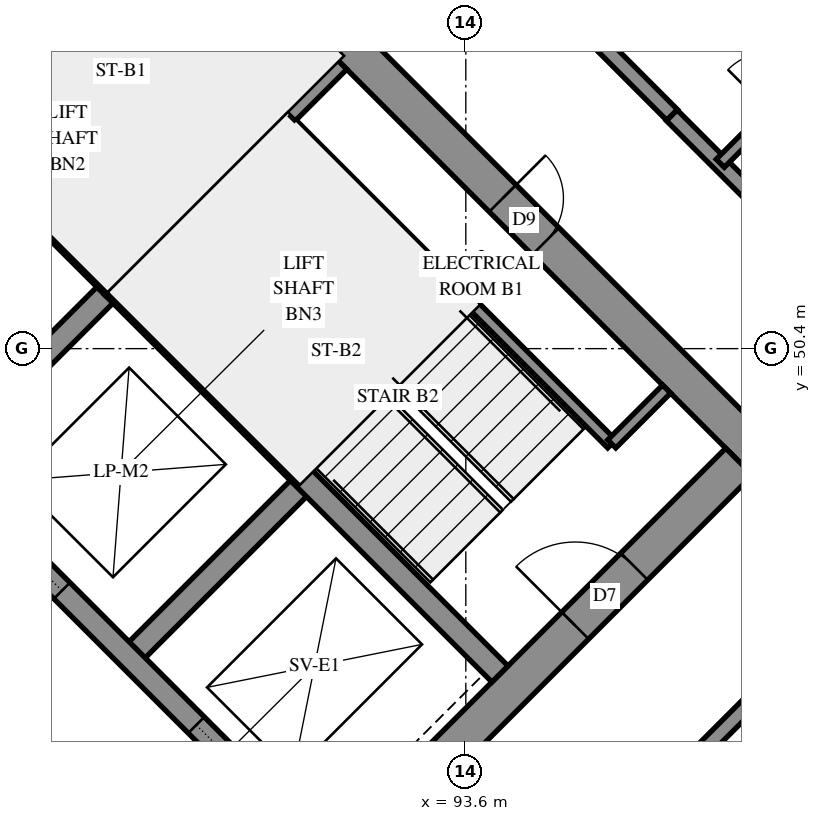
"""IFC4 building model, lengths in metres.
Left out: names, types, materials, properties, quantities, classifications, styles, units other than length and angle.
Written with IfcOpenShell. Run it as: python <this file> out.ifc"""

import sys

from ifc_helpers import new_model, si_unit, direction, frame, frame_2d, origin, place, context, subcontext, project, spatial, rectangle, extrude, element, fill, save


model = new_model("IFC4")
c1 = context("Model", 3, precision=1e-05, world=origin(), true_north=direction((0.0, 1.0)))
c2 = subcontext(c1, "Body", "Model", "MODEL_VIEW")
j1 = project(units=[si_unit("LENGTHUNIT", "METRE"), si_unit("PLANEANGLEUNIT", "RADIAN")], contexts=[c1])
p1 = place(None, origin())
s1 = spatial("IfcSite", under=j1, at=p1, CompositionType="ELEMENT")
p2 = place(p1, origin())
s2 = spatial("IfcBuilding", under=s1, at=p2, CompositionType="ELEMENT")
p3 = place(p2, frame((0.0, 0.0, 199.8)))
s3 = spatial("IfcBuildingStorey", under=s2, at=p3, CompositionType="ELEMENT", Elevation=199.8)
p4 = place(p3, frame((86.66, 59.802, -0.3), z_axis=(0.0, 0.0, 1.0), x_axis=(0.7071067812, -0.7071067812, 0.0)))
e1 = element("IfcWall", 1, at=p4, inside=s3, PredefinedType="SHEAR", context=c2, shape_type="SweptSolid", body=[
    extrude(rectangle(XDim=15.4, YDim=0.5, at=frame_2d((7.7, 0.0))), origin(), (0.0, 0.0, 1.0), 2.7),
])
p5 = place(p4, frame((10.5, 0.0, 0.3)))
e2 = element("IfcOpeningElement", 2, at=p5, cuts=e1, PredefinedType="OPENING", context=c2, shape_type="SweptSolid", body=[
    extrude(rectangle(XDim=0.8, YDim=2.1, at=frame_2d((0.4, 1.05))), frame((0.0, 0.26, 0.0), z_axis=(0.0, -1.0, 0.0), x_axis=(1.0, 0.0, 0.0)), (0.0, 0.0, 1.0), 0.52),
])
p6 = place(p3, frame((87.013, 38.731, -0.3), z_axis=(0.0, 0.0, 1.0), x_axis=(0.7071067812, 0.7071067812, 0.0)))
e3 = element("IfcWall", 3, at=p6, inside=s3, PredefinedType="SHEAR", context=c2, shape_type="SweptSolid", body=[
    extrude(rectangle(XDim=14.4, YDim=0.5, at=frame_2d((7.2, 0.0))), origin(), (0.0, 0.0, 1.0), 2.7),
])
p7 = place(p6, frame((4.55, 0.0, 0.3)))
e4 = element("IfcOpeningElement", 4, at=p7, cuts=e3, PredefinedType="OPENING", context=c2, shape_type="SweptSolid", body=[
    extrude(rectangle(XDim=1.1, YDim=2.1, at=frame_2d((0.55, 1.05))), frame((0.0, 0.26, 0.0), z_axis=(0.0, -1.0, 0.0), x_axis=(1.0, 0.0, 0.0)), (0.0, 0.0, 1.0), 0.52),
])
p8 = place(p6, frame((11.35, 0.0, 0.3)))
e5 = element("IfcOpeningElement", 5, at=p8, cuts=e3, PredefinedType="OPENING", context=c2, shape_type="SweptSolid", body=[
    extrude(rectangle(XDim=1.1, YDim=2.1, at=frame_2d((0.55, 1.05))), frame((0.0, 0.26, 0.0), z_axis=(0.0, -1.0, 0.0), x_axis=(1.0, 0.0, 0.0)), (0.0, 0.0, 1.0), 0.52),
])
for number, where, z_axis, x_axis in (
    (6, (86.625, 48.878, 0.0), (0.0, 0.0, 1.0), (0.707, 0.707, 0.0)),
    (7, (89.17, 46.332, 0.0), (0.0, 0.0, 1.0), (0.707, 0.707, 0.0)),
):
    element("IfcWall", number, at=place(p3, frame(where, z_axis=z_axis, x_axis=x_axis)), inside=s3, PredefinedType="SOLIDWALL", context=c2, shape_type="SweptSolid", body=[
        extrude(rectangle(XDim=3.3, YDim=0.3, at=frame_2d((1.65, 0.0))), origin(), (0.0, 0.0, 1.0), 3.1),
    ])
p9 = place(p3, frame((78.988, 51.423, 0.0), z_axis=(0.0, 0.0, 1.0), x_axis=(0.7071067812, -0.7071067812, 0.0)))
e8 = element("IfcWall", 8, at=p9, inside=s3, PredefinedType="SOLIDWALL", context=c2, shape_type="SweptSolid", body=[
    extrude(rectangle(XDim=14.4, YDim=0.3, at=frame_2d((7.2, 0.0))), origin(), (0.0, 0.0, 1.0), 3.1),
])
p10 = place(p9, frame((1.35, 0.0, 0.0)))
e9 = element("IfcOpeningElement", 9, at=p10, cuts=e8, PredefinedType="OPENING", context=c2, shape_type="SweptSolid", body=[
    extrude(rectangle(XDim=0.9, YDim=2.1, at=frame_2d((0.45, 1.05))), frame((0.0, 0.16, 0.0), z_axis=(0.0, -1.0, 0.0), x_axis=(1.0, 0.0, 0.0)), (0.0, 0.0, 1.0), 0.32),
])
p11 = place(p9, frame((4.95, 0.0, 0.0)))
e10 = element("IfcOpeningElement", 10, at=p11, cuts=e8, PredefinedType="OPENING", context=c2, shape_type="SweptSolid", body=[
    extrude(rectangle(XDim=0.9, YDim=2.1, at=frame_2d((0.45, 1.05))), frame((0.0, 0.16, 0.0), z_axis=(0.0, -1.0, 0.0), x_axis=(1.0, 0.0, 0.0)), (0.0, 0.0, 1.0), 0.32),
])
p12 = place(p9, frame((8.55, 0.0, 0.0)))
e11 = element("IfcOpeningElement", 11, at=p12, cuts=e8, PredefinedType="OPENING", context=c2, shape_type="SweptSolid", body=[
    extrude(rectangle(XDim=0.9, YDim=2.1, at=frame_2d((0.45, 1.05))), frame((0.0, 0.16, 0.0), z_axis=(0.0, -1.0, 0.0), x_axis=(1.0, 0.0, 0.0)), (0.0, 0.0, 1.0), 0.32),
])
p13 = place(p9, frame((12.05, 0.0, 0.0)))
e12 = element("IfcOpeningElement", 12, at=p13, cuts=e8, PredefinedType="OPENING", context=c2, shape_type="SweptSolid", body=[
    extrude(rectangle(XDim=1.1, YDim=2.1, at=frame_2d((0.55, 1.05))), frame((0.0, 0.16, 0.0), z_axis=(0.0, -1.0, 0.0), x_axis=(1.0, 0.0, 0.0)), (0.0, 0.0, 1.0), 0.32),
])
p14 = place(p3, frame((81.534, 53.969, 0.0), z_axis=(0.0, 0.0, 1.0), x_axis=(0.707103309, -0.7071102534, 0.0)))
e13 = element("IfcWall", 13, at=p14, inside=s3, PredefinedType="SOLIDWALL", context=c2, shape_type="SweptSolid", body=[
    extrude(rectangle(XDim=14.4, YDim=0.3, at=frame_2d((7.2, 0.0))), origin(), (0.0, 0.0, 1.0), 3.1),
])
p15 = place(p14, frame((1.25, 0.0, 0.0)))
e14 = element("IfcOpeningElement", 14, at=p15, cuts=e13, PredefinedType="OPENING", context=c2, shape_type="SweptSolid", body=[
    extrude(rectangle(XDim=1.1, YDim=2.1, at=frame_2d((0.55, 1.05))), frame((0.0, 0.16, 0.0), z_axis=(0.0, -1.0, 0.0), x_axis=(1.0, 0.0, 0.0)), (0.0, 0.0, 1.0), 0.32),
])
p16 = place(p14, frame((4.85, 0.0, 0.0)))
e15 = element("IfcOpeningElement", 15, at=p16, cuts=e13, PredefinedType="OPENING", context=c2, shape_type="SweptSolid", body=[
    extrude(rectangle(XDim=1.1, YDim=2.1, at=frame_2d((0.55, 1.05))), frame((0.0, 0.16, 0.0), z_axis=(0.0, -1.0, 0.0), x_axis=(1.0, 0.0, 0.0)), (0.0, 0.0, 1.0), 0.32),
])
p17 = place(p14, frame((8.45, 0.0, 0.0)))
e16 = element("IfcOpeningElement", 16, at=p17, cuts=e13, PredefinedType="OPENING", context=c2, shape_type="SweptSolid", body=[
    extrude(rectangle(XDim=1.1, YDim=2.1, at=frame_2d((0.55, 1.05))), frame((0.0, 0.16, 0.0), z_axis=(0.0, -1.0, 0.0), x_axis=(1.0, 0.0, 0.0)), (0.0, 0.0, 1.0), 0.32),
])
p18 = place(p14, frame((12.05, 0.0, 0.0)))
e17 = element("IfcOpeningElement", 17, at=p18, cuts=e13, PredefinedType="OPENING", context=c2, shape_type="SweptSolid", body=[
    extrude(rectangle(XDim=1.1, YDim=2.1, at=frame_2d((0.55, 1.05))), frame((0.0, 0.16, 0.0), z_axis=(0.0, -1.0, 0.0), x_axis=(1.0, 0.0, 0.0)), (0.0, 0.0, 1.0), 0.32),
])
for number, where, z_axis, x_axis in (
    (18, (83.867, 56.302, 0.0), (0.0, 0.0, 1.0), (0.707, -0.707, 0.0)),
    (19, (88.958, 51.211, 0.0), (0.0, 0.0, 1.0), (0.707, -0.707, 0.0)),
):
    element("IfcWall", number, at=place(p3, frame(where, z_axis=z_axis, x_axis=x_axis)), inside=s3, PredefinedType="SOLIDWALL", context=c2, shape_type="SweptSolid", body=[
        extrude(rectangle(XDim=7.2, YDim=0.3, at=frame_2d((3.6, 0.0))), origin(), (0.0, 0.0, 1.0), 3.1),
    ])
p19 = place(p3, frame((88.958, 51.211, 0.0), z_axis=(0.0, 0.0, 1.0), x_axis=(0.7071067812, 0.7071067812, 0.0)))
e20 = element("IfcWall", 20, at=p19, inside=s3, PredefinedType="SOLIDWALL", context=c2, shape_type="SweptSolid", body=[
    extrude(rectangle(XDim=4.2, YDim=0.3, at=frame_2d((2.1, 0.0))), origin(), (0.0, 0.0, 1.0), 3.1),
])
p20 = place(p3, frame((91.313, 53.354, 0.0), z_axis=(0.0, 0.0, 1.0), x_axis=(0.7071067812, -0.7071067812, 0.0)))
e21 = element("IfcWall", 21, at=p20, inside=s3, PredefinedType="PARTITIONING", context=c2, shape_type="SweptSolid", body=[
    extrude(rectangle(XDim=5.95, YDim=0.15, at=frame_2d((2.975, 0.0))), origin(), (0.0, 0.0, 1.0), 3.1),
])
p21 = place(p3, frame((95.52, 49.146, 0.0), z_axis=(0.0, 0.0, 1.0), x_axis=(0.7071067812, 0.7071067812, 0.0)))
e22 = element("IfcWall", 22, at=p21, inside=s3, PredefinedType="PARTITIONING", context=c2, shape_type="SweptSolid", body=[
    extrude(rectangle(XDim=1.02, YDim=0.15, at=frame_2d((0.51, 0.0))), origin(), (0.0, 0.0, 1.0), 3.1),
])
p22 = place(p3, frame((93.695, 42.091, 0.0), z_axis=(0.0, 0.0, 1.0), x_axis=(0.7071067812, 0.7071067812, 0.0)))
e23 = element("IfcWall", 23, at=p22, inside=s3, PredefinedType="PARTITIONING", context=c2, shape_type="SweptSolid", body=[
    extrude(rectangle(XDim=9.899, YDim=0.2, at=frame_2d((4.95, 0.0))), origin(), (0.0, 0.0, 1.0), 3.1),
])
p23 = place(p22, frame((0.255, 0.0, 0.0)))
e24 = element("IfcOpeningElement", 24, at=p23, cuts=e23, PredefinedType="OPENING", context=c2, shape_type="SweptSolid", body=[
    extrude(rectangle(XDim=1.0, YDim=2.1, at=frame_2d((0.5, 1.05))), frame((0.0, 0.11, 0.0), z_axis=(0.0, -1.0, 0.0), x_axis=(1.0, 0.0, 0.0)), (0.0, 0.0, 1.0), 0.22),
])
p24 = place(p3, frame((94.402, 41.382, 0.0), z_axis=(0.0, 0.0, 1.0), x_axis=(0.7072538072, 0.7069597246, 0.0)))
e25 = element("IfcWall", 25, at=p24, inside=s3, PredefinedType="PARTITIONING", context=c2, shape_type="SweptSolid", body=[
    extrude(rectangle(XDim=6.801, YDim=0.2, at=frame_2d((3.4, 0.0))), origin(), (0.0, 0.0, 1.0), 3.1),
])
p25 = place(p3, frame((96.309, 53.471, 0.0), z_axis=(0.0, 0.0, 1.0), x_axis=(0.7071067812, -0.7071067812, 0.0)))
e26 = element("IfcWall", 26, at=p25, inside=s3, PredefinedType="PARTITIONING", context=c2, shape_type="SweptSolid", body=[
    extrude(rectangle(XDim=6.2, YDim=0.2, at=frame_2d((3.1, 0.0))), origin(), (0.0, 0.0, 1.0), 3.1),
])
p26 = place(p3, frame((96.948, 52.838, 0.0), z_axis=(0.0, 0.0, 1.0), x_axis=(0.7070823329, 0.7071312287, 0.0)))
e27 = element("IfcWall", 27, at=p26, inside=s3, PredefinedType="PARTITIONING", context=c2, shape_type="SweptSolid", body=[
    extrude(rectangle(XDim=2.045, YDim=0.15, at=frame_2d((1.023, 0.0))), origin(), (0.0, 0.0, 1.0), 3.1),
])
p27 = place(p26, frame((0.943, 0.0, 0.0)))
e28 = element("IfcOpeningElement", 28, at=p27, cuts=e27, PredefinedType="OPENING", context=c2, shape_type="SweptSolid", body=[
    extrude(rectangle(XDim=0.8, YDim=2.1, at=frame_2d((0.4, 1.05))), frame((0.0, 0.085, 0.0), z_axis=(0.0, -1.0, 0.0), x_axis=(1.0, 0.0, 0.0)), (0.0, 0.0, 1.0), 0.17),
])
p28 = place(p3, frame((95.041, 54.749, 0.0), z_axis=(0.0, 0.0, 1.0), x_axis=(0.7065510983, -0.7076620277, 0.0)))
e29 = element("IfcWall", 29, at=p28, inside=s3, PredefinedType="PARTITIONING", context=c2, shape_type="SweptSolid", body=[
    extrude(rectangle(XDim=1.8, YDim=0.2, at=frame_2d((0.9, 0.0))), origin(), (0.0, 0.0, 1.0), 3.1),
])
p29 = place(p5, origin())
e30 = element("IfcDoor", 30, at=p29, inside=s3, OperationType="SINGLE_SWING_RIGHT", PredefinedType="DOOR", context=c2, shape_type="SweptSolid", body=[
    extrude(rectangle(XDim=0.8, YDim=2.1, at=frame_2d((0.4, 1.05))), frame((0.0, 0.025, 0.0), z_axis=(0.0, -1.0, 0.0), x_axis=(1.0, 0.0, 0.0)), (0.0, 0.0, 1.0), 0.05),
])
fill(e2, e30)
p30 = place(p8, origin())
e31 = element("IfcDoor", 31, at=p30, inside=s3, OperationType="SINGLE_SWING_RIGHT", PredefinedType="DOOR", context=c2, shape_type="SweptSolid", body=[
    extrude(rectangle(XDim=1.1, YDim=2.1, at=frame_2d((0.55, 1.05))), frame((0.0, 0.025, 0.0), z_axis=(0.0, -1.0, 0.0), x_axis=(1.0, 0.0, 0.0)), (0.0, 0.0, 1.0), 0.05),
])
fill(e5, e31)
p31 = place(p17, origin())
e32 = element("IfcDoor", 32, at=p31, inside=s3, OperationType="SLIDING_TO_LEFT", PredefinedType="DOOR", context=c2, shape_type="SweptSolid", body=[
    extrude(rectangle(XDim=1.1, YDim=2.1, at=frame_2d((0.55, 1.05))), frame((0.0, 0.025, 0.0), z_axis=(0.0, -1.0, 0.0), x_axis=(1.0, 0.0, 0.0)), (0.0, 0.0, 1.0), 0.05),
])
fill(e16, e32)
p32 = place(p18, origin())
e33 = element("IfcDoor", 33, at=p32, inside=s3, OperationType="SLIDING_TO_RIGHT", PredefinedType="DOOR", context=c2, shape_type="SweptSolid", body=[
    extrude(rectangle(XDim=1.1, YDim=2.1, at=frame_2d((0.55, 1.05))), frame((0.0, 0.025, 0.0), z_axis=(0.0, -1.0, 0.0), x_axis=(1.0, 0.0, 0.0)), (0.0, 0.0, 1.0), 0.05),
])
fill(e17, e33)
save(model, sys.argv[1])
